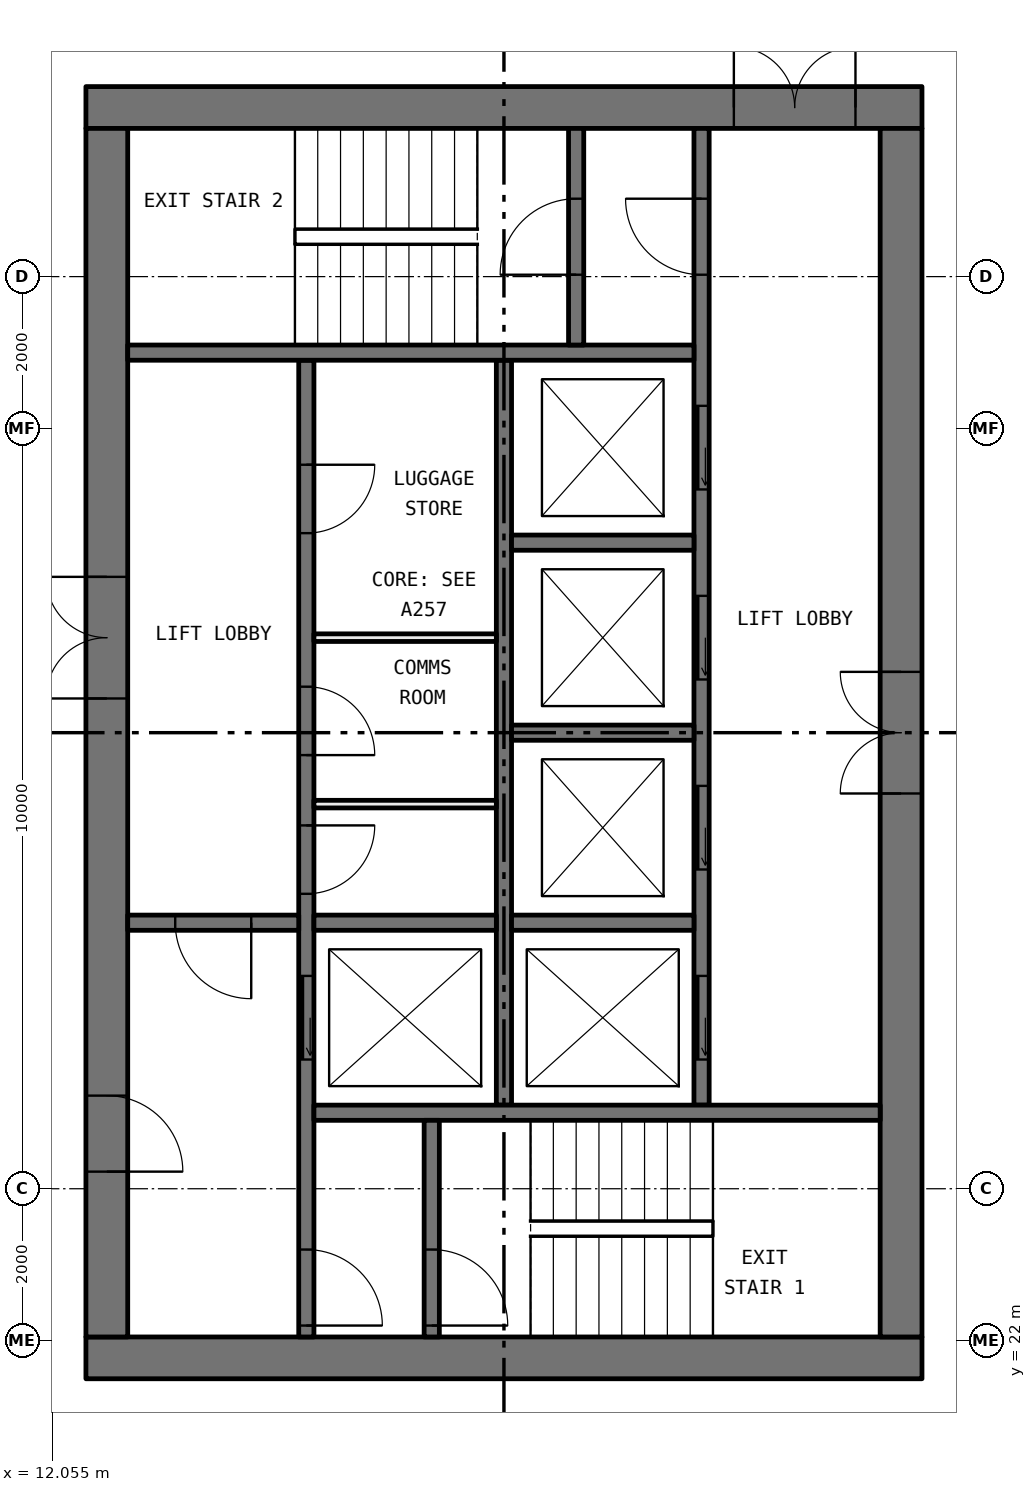
"""IFC4 building model, lengths in metres.
Left out: names, types, materials, properties, quantities, classifications, styles, units other than length and angle.
Written with IfcOpenShell. Run it as: python <this file> out.ifc"""

import sys

from ifc_helpers import new_model, si_unit, direction, frame, frame_2d, origin, place, context, subcontext, project, spatial, rectangle, extrude, element, fill, save


model = new_model("IFC4")
c1 = context("Model", 3, precision=1e-05, world=origin(), true_north=direction((0.0, 1.0)))
c2 = subcontext(c1, "Body", "Model", "MODEL_VIEW")
j1 = project(units=[si_unit("LENGTHUNIT", "METRE"), si_unit("PLANEANGLEUNIT", "RADIAN")], contexts=[c1])
p1 = place(None, origin())
s1 = spatial("IfcSite", under=j1, at=p1, CompositionType="ELEMENT")
p2 = place(p1, origin())
s2 = spatial("IfcBuilding", under=s1, at=p2, CompositionType="ELEMENT")
p3 = place(p2, frame((0.0, 0.0, 210.0)))
s3 = spatial("IfcBuildingStorey", under=s2, at=p3, CompositionType="ELEMENT", Elevation=210.0)
p4 = place(p3, frame((12.5, 21.775, 0.0), z_axis=(0.0, 0.0, 1.0), x_axis=(1.0, 0.0, 0.0)))
e1 = element("IfcWall", 1, at=p4, inside=s3, PredefinedType="SHEAR", context=c2, shape_type="SweptSolid", body=[
    extrude(rectangle(XDim=11.0, YDim=0.55, at=frame_2d((5.5, 0.0))), origin(), (0.0, 0.0, 1.0), 3.05),
])
p5 = place(p3, frame((12.5, 38.225, 0.0), z_axis=(0.0, 0.0, 1.0), x_axis=(1.0, 0.0, 0.0)))
e2 = element("IfcWall", 2, at=p5, inside=s3, PredefinedType="SHEAR", context=c2, shape_type="SweptSolid", body=[
    extrude(rectangle(XDim=11.0, YDim=0.55, at=frame_2d((5.5, 0.0))), origin(), (0.0, 0.0, 1.0), 3.05),
])
p6 = place(p5, frame((8.525, 0.0, 0.0)))
e3 = element("IfcOpeningElement", 3, at=p6, cuts=e2, PredefinedType="OPENING", context=c2, shape_type="SweptSolid", body=[
    extrude(rectangle(XDim=1.6, YDim=2.1, at=frame_2d((0.8, 1.05))), frame((0.0, 0.285, 0.0), z_axis=(0.0, -1.0, 0.0), x_axis=(1.0, 0.0, 0.0)), (0.0, 0.0, 1.0), 0.57),
])
p7 = place(p3, frame((12.775, 22.05, 0.0), z_axis=(0.0, 0.0, 1.0), x_axis=(0.0, 1.0, 0.0)))
e4 = element("IfcWall", 4, at=p7, inside=s3, PredefinedType="SHEAR", context=c2, shape_type="SweptSolid", body=[
    extrude(rectangle(XDim=15.9, YDim=0.55, at=frame_2d((7.95, 0.0))), origin(), (0.0, 0.0, 1.0), 3.05),
])
p8 = place(p7, frame((8.4, 0.0, 0.0)))
e5 = element("IfcOpeningElement", 5, at=p8, cuts=e4, PredefinedType="OPENING", context=c2, shape_type="SweptSolid", body=[
    extrude(rectangle(XDim=1.6, YDim=2.1, at=frame_2d((0.8, 1.05))), frame((0.0, 0.285, 0.0), z_axis=(0.0, -1.0, 0.0), x_axis=(1.0, 0.0, 0.0)), (0.0, 0.0, 1.0), 0.57),
])
p9 = place(p7, frame((2.175, 0.0, 0.0)))
e6 = element("IfcOpeningElement", 6, at=p9, cuts=e4, PredefinedType="OPENING", context=c2, shape_type="SweptSolid", body=[
    extrude(rectangle(XDim=1.0, YDim=2.1, at=frame_2d((0.5, 1.05))), frame((0.0, 0.285, 0.0), z_axis=(0.0, -1.0, 0.0), x_axis=(1.0, 0.0, 0.0)), (0.0, 0.0, 1.0), 0.57),
])
p10 = place(p3, frame((23.225, 22.05, 0.0), z_axis=(0.0, 0.0, 1.0), x_axis=(0.0, 1.0, 0.0)))
e7 = element("IfcWall", 7, at=p10, inside=s3, PredefinedType="SHEAR", context=c2, shape_type="SweptSolid", body=[
    extrude(rectangle(XDim=15.9, YDim=0.55, at=frame_2d((7.95, 0.0))), origin(), (0.0, 0.0, 1.0), 3.05),
])
p11 = place(p10, frame((7.15, 0.0, 0.0)))
e8 = element("IfcOpeningElement", 8, at=p11, cuts=e7, PredefinedType="OPENING", context=c2, shape_type="SweptSolid", body=[
    extrude(rectangle(XDim=1.6, YDim=2.1, at=frame_2d((0.8, 1.05))), frame((0.0, 0.285, 0.0), z_axis=(0.0, -1.0, 0.0), x_axis=(1.0, 0.0, 0.0)), (0.0, 0.0, 1.0), 0.57),
])
p12 = place(p3, frame((15.4, 22.05, 0.0), z_axis=(0.0, 0.0, 1.0), x_axis=(0.0, 1.0, 0.0)))
e9 = element("IfcWall", 9, at=p12, inside=s3, PredefinedType="SOLIDWALL", context=c2, shape_type="SweptSolid", body=[
    extrude(rectangle(XDim=12.85, YDim=0.2, at=frame_2d((6.425, 0.0))), origin(), (0.0, 0.0, 1.0), 3.05),
])
p13 = place(p12, frame((3.65, 0.0, 0.0)))
e10 = element("IfcOpeningElement", 10, at=p13, cuts=e9, PredefinedType="OPENING", context=c2, shape_type="SweptSolid", body=[
    extrude(rectangle(XDim=1.1, YDim=2.1, at=frame_2d((0.55, 1.05))), frame((0.0, 0.11, 0.0), z_axis=(0.0, -1.0, 0.0), x_axis=(1.0, 0.0, 0.0)), (0.0, 0.0, 1.0), 0.22),
])
p14 = place(p12, frame((0.15, 0.0, 0.0)))
e11 = element("IfcOpeningElement", 11, at=p14, cuts=e9, PredefinedType="OPENING", context=c2, shape_type="SweptSolid", body=[
    extrude(rectangle(XDim=1.0, YDim=2.1, at=frame_2d((0.5, 1.05))), frame((0.0, 0.11, 0.0), z_axis=(0.0, -1.0, 0.0), x_axis=(1.0, 0.0, 0.0)), (0.0, 0.0, 1.0), 0.22),
])
p15 = place(p12, frame((5.83, 0.0, 0.0)))
e12 = element("IfcOpeningElement", 12, at=p15, cuts=e9, PredefinedType="OPENING", context=c2, shape_type="SweptSolid", body=[
    extrude(rectangle(XDim=0.9, YDim=2.1, at=frame_2d((0.45, 1.05))), frame((0.0, 0.11, 0.0), z_axis=(0.0, -1.0, 0.0), x_axis=(1.0, 0.0, 0.0)), (0.0, 0.0, 1.0), 0.22),
])
p16 = place(p12, frame((7.655, 0.0, 0.0)))
e13 = element("IfcOpeningElement", 13, at=p16, cuts=e9, PredefinedType="OPENING", context=c2, shape_type="SweptSolid", body=[
    extrude(rectangle(XDim=0.9, YDim=2.1, at=frame_2d((0.45, 1.05))), frame((0.0, 0.11, 0.0), z_axis=(0.0, -1.0, 0.0), x_axis=(1.0, 0.0, 0.0)), (0.0, 0.0, 1.0), 0.22),
])
p17 = place(p12, frame((10.575, 0.0, 0.0)))
e14 = element("IfcOpeningElement", 14, at=p17, cuts=e9, PredefinedType="OPENING", context=c2, shape_type="SweptSolid", body=[
    extrude(rectangle(XDim=0.9, YDim=2.1, at=frame_2d((0.45, 1.05))), frame((0.0, 0.11, 0.0), z_axis=(0.0, -1.0, 0.0), x_axis=(1.0, 0.0, 0.0)), (0.0, 0.0, 1.0), 0.22),
])
p18 = place(p3, frame((20.6, 25.1, 0.0), z_axis=(0.0, 0.0, 1.0), x_axis=(0.0, 1.0, 0.0)))
e15 = element("IfcWall", 15, at=p18, inside=s3, PredefinedType="SOLIDWALL", context=c2, shape_type="SweptSolid", body=[
    extrude(rectangle(XDim=12.85, YDim=0.2, at=frame_2d((6.425, 0.0))), origin(), (0.0, 0.0, 1.0), 3.05),
])
p19 = place(p18, frame((0.6, 0.0, 0.0)))
e16 = element("IfcOpeningElement", 16, at=p19, cuts=e15, PredefinedType="OPENING", context=c2, shape_type="SweptSolid", body=[
    extrude(rectangle(XDim=1.1, YDim=2.1, at=frame_2d((0.55, 1.05))), frame((0.0, 0.11, 0.0), z_axis=(0.0, -1.0, 0.0), x_axis=(1.0, 0.0, 0.0)), (0.0, 0.0, 1.0), 0.22),
])
p20 = place(p18, frame((3.1, 0.0, 0.0)))
e17 = element("IfcOpeningElement", 17, at=p20, cuts=e15, PredefinedType="OPENING", context=c2, shape_type="SweptSolid", body=[
    extrude(rectangle(XDim=1.1, YDim=2.1, at=frame_2d((0.55, 1.05))), frame((0.0, 0.11, 0.0), z_axis=(0.0, -1.0, 0.0), x_axis=(1.0, 0.0, 0.0)), (0.0, 0.0, 1.0), 0.22),
])
p21 = place(p18, frame((5.6, 0.0, 0.0)))
e18 = element("IfcOpeningElement", 18, at=p21, cuts=e15, PredefinedType="OPENING", context=c2, shape_type="SweptSolid", body=[
    extrude(rectangle(XDim=1.1, YDim=2.1, at=frame_2d((0.55, 1.05))), frame((0.0, 0.11, 0.0), z_axis=(0.0, -1.0, 0.0), x_axis=(1.0, 0.0, 0.0)), (0.0, 0.0, 1.0), 0.22),
])
p22 = place(p18, frame((8.1, 0.0, 0.0)))
e19 = element("IfcOpeningElement", 19, at=p22, cuts=e15, PredefinedType="OPENING", context=c2, shape_type="SweptSolid", body=[
    extrude(rectangle(XDim=1.1, YDim=2.1, at=frame_2d((0.55, 1.05))), frame((0.0, 0.11, 0.0), z_axis=(0.0, -1.0, 0.0), x_axis=(1.0, 0.0, 0.0)), (0.0, 0.0, 1.0), 0.22),
])
p23 = place(p18, frame((10.925, 0.0, 0.0)))
e20 = element("IfcOpeningElement", 20, at=p23, cuts=e15, PredefinedType="OPENING", context=c2, shape_type="SweptSolid", body=[
    extrude(rectangle(XDim=1.0, YDim=2.1, at=frame_2d((0.5, 1.05))), frame((0.0, 0.11, 0.0), z_axis=(0.0, -1.0, 0.0), x_axis=(1.0, 0.0, 0.0)), (0.0, 0.0, 1.0), 0.22),
])
p24 = place(p3, frame((18.0, 25.1, 0.0), z_axis=(0.0, 0.0, 1.0), x_axis=(0.0, 1.0, 0.0)))
e21 = element("IfcWall", 21, at=p24, inside=s3, PredefinedType="SOLIDWALL", context=c2, shape_type="SweptSolid", body=[
    extrude(rectangle(XDim=9.8, YDim=0.2, at=frame_2d((4.9, 0.0))), origin(), (0.0, 0.0, 1.0), 3.05),
])
for number, where, z_axis, x_axis in (
    (22, (15.5, 25.0, 0.0), (0.0, 0.0, 1.0), (1.0, 0.0, 0.0)),
    (23, (13.05, 35.0, 0.0), (0.0, 0.0, 1.0), (1.0, 0.0, 0.0)),
):
    element("IfcWall", number, at=place(p3, frame(where, z_axis=z_axis, x_axis=x_axis)), inside=s3, PredefinedType="SOLIDWALL", context=c2, shape_type="SweptSolid", body=[
        extrude(rectangle(XDim=7.45, YDim=0.2, at=frame_2d((3.725, 0.0))), origin(), (0.0, 0.0, 1.0), 3.05),
    ])
p25 = place(p3, frame((13.05, 27.5, 0.0), z_axis=(0.0, 0.0, 1.0), x_axis=(1.0, 0.0, 0.0)))
e24 = element("IfcWall", 24, at=p25, inside=s3, PredefinedType="SOLIDWALL", context=c2, shape_type="SweptSolid", body=[
    extrude(rectangle(XDim=2.25, YDim=0.2, at=frame_2d((1.125, 0.0))), origin(), (0.0, 0.0, 1.0), 3.05),
])
p26 = place(p25, frame((0.625, 0.0, 0.0)))
e25 = element("IfcOpeningElement", 25, at=p26, cuts=e24, PredefinedType="OPENING", context=c2, shape_type="SweptSolid", body=[
    extrude(rectangle(XDim=1.0, YDim=2.1, at=frame_2d((0.5, 1.05))), frame((0.0, 0.11, 0.0), z_axis=(0.0, -1.0, 0.0), x_axis=(1.0, 0.0, 0.0)), (0.0, 0.0, 1.0), 0.22),
])
p27 = place(p3, frame((17.05, 22.05, 0.0), z_axis=(0.0, 0.0, 1.0), x_axis=(0.0, 1.0, 0.0)))
e26 = element("IfcWall", 26, at=p27, inside=s3, PredefinedType="SOLIDWALL", context=c2, shape_type="SweptSolid", body=[
    extrude(rectangle(XDim=2.85, YDim=0.2, at=frame_2d((1.425, 0.0))), origin(), (0.0, 0.0, 1.0), 3.05),
])
p28 = place(p27, frame((0.15, 0.0, 0.0)))
e27 = element("IfcOpeningElement", 27, at=p28, cuts=e26, PredefinedType="OPENING", context=c2, shape_type="SweptSolid", body=[
    extrude(rectangle(XDim=1.0, YDim=2.1, at=frame_2d((0.5, 1.05))), frame((0.0, 0.11, 0.0), z_axis=(0.0, -1.0, 0.0), x_axis=(1.0, 0.0, 0.0)), (0.0, 0.0, 1.0), 0.22),
])
p29 = place(p3, frame((18.95, 35.1, 0.0), z_axis=(0.0, 0.0, 1.0), x_axis=(0.0, 1.0, 0.0)))
e28 = element("IfcWall", 28, at=p29, inside=s3, PredefinedType="SOLIDWALL", context=c2, shape_type="SweptSolid", body=[
    extrude(rectangle(XDim=2.85, YDim=0.2, at=frame_2d((1.425, 0.0))), origin(), (0.0, 0.0, 1.0), 3.05),
])
p30 = place(p29, frame((0.925, 0.0, 0.0)))
e29 = element("IfcOpeningElement", 29, at=p30, cuts=e28, PredefinedType="OPENING", context=c2, shape_type="SweptSolid", body=[
    extrude(rectangle(XDim=1.0, YDim=2.1, at=frame_2d((0.5, 1.05))), frame((0.0, 0.11, 0.0), z_axis=(0.0, -1.0, 0.0), x_axis=(1.0, 0.0, 0.0)), (0.0, 0.0, 1.0), 0.22),
])
for number, where, z_axis, x_axis in (
    (30, (15.5, 27.5, 0.0), (0.0, 0.0, 1.0), (1.0, 0.0, 0.0)),
    (31, (18.1, 27.5, 0.0), (0.0, 0.0, 1.0), (1.0, 0.0, 0.0)),
    (32, (18.1, 30.0, 0.0), (0.0, 0.0, 1.0), (1.0, 0.0, 0.0)),
    (33, (18.1, 32.5, 0.0), (0.0, 0.0, 1.0), (1.0, 0.0, 0.0)),
):
    element("IfcWall", number, at=place(p3, frame(where, z_axis=z_axis, x_axis=x_axis)), inside=s3, PredefinedType="SOLIDWALL", context=c2, shape_type="SweptSolid", body=[
        extrude(rectangle(XDim=2.4, YDim=0.2, at=frame_2d((1.2, 0.0))), origin(), (0.0, 0.0, 1.0), 3.05),
    ])
for number, where, z_axis, x_axis in (
    (34, (15.5, 29.06, 0.0), (0.0, 0.0, 1.0), (1.0, 0.0, 0.0)),
    (35, (15.5, 31.25, 0.0), (0.0, 0.0, 1.0), (1.0, 0.0, 0.0)),
):
    element("IfcWall", number, at=place(p3, frame(where, z_axis=z_axis, x_axis=x_axis)), inside=s3, PredefinedType="PARTITIONING", context=c2, shape_type="SweptSolid", body=[
        extrude(rectangle(XDim=2.4, YDim=0.1, at=frame_2d((1.2, 0.0))), origin(), (0.0, 0.0, 1.0), 3.05),
    ])
p31 = place(p19, origin())
e36 = element("IfcDoor", 36, at=p31, inside=s3, OperationType="SLIDING_TO_LEFT", PredefinedType="DOOR", context=c2, shape_type="SweptSolid", body=[
    extrude(rectangle(XDim=1.1, YDim=2.1, at=frame_2d((0.55, 1.05))), frame((0.0, 0.025, 0.0), z_axis=(0.0, -1.0, 0.0), x_axis=(1.0, 0.0, 0.0)), (0.0, 0.0, 1.0), 0.05),
])
fill(e16, e36)
p32 = place(p20, origin())
e37 = element("IfcDoor", 37, at=p32, inside=s3, OperationType="SLIDING_TO_LEFT", PredefinedType="DOOR", context=c2, shape_type="SweptSolid", body=[
    extrude(rectangle(XDim=1.1, YDim=2.1, at=frame_2d((0.55, 1.05))), frame((0.0, 0.025, 0.0), z_axis=(0.0, -1.0, 0.0), x_axis=(1.0, 0.0, 0.0)), (0.0, 0.0, 1.0), 0.05),
])
fill(e17, e37)
p33 = place(p21, origin())
e38 = element("IfcDoor", 38, at=p33, inside=s3, OperationType="SLIDING_TO_LEFT", PredefinedType="DOOR", context=c2, shape_type="SweptSolid", body=[
    extrude(rectangle(XDim=1.1, YDim=2.1, at=frame_2d((0.55, 1.05))), frame((0.0, 0.025, 0.0), z_axis=(0.0, -1.0, 0.0), x_axis=(1.0, 0.0, 0.0)), (0.0, 0.0, 1.0), 0.05),
])
fill(e18, e38)
p34 = place(p22, origin())
e39 = element("IfcDoor", 39, at=p34, inside=s3, OperationType="SLIDING_TO_LEFT", PredefinedType="DOOR", context=c2, shape_type="SweptSolid", body=[
    extrude(rectangle(XDim=1.1, YDim=2.1, at=frame_2d((0.55, 1.05))), frame((0.0, 0.025, 0.0), z_axis=(0.0, -1.0, 0.0), x_axis=(1.0, 0.0, 0.0)), (0.0, 0.0, 1.0), 0.05),
])
fill(e19, e39)
p35 = place(p13, origin())
e40 = element("IfcDoor", 40, at=p35, inside=s3, OperationType="SLIDING_TO_LEFT", PredefinedType="DOOR", context=c2, shape_type="SweptSolid", body=[
    extrude(rectangle(XDim=1.1, YDim=2.1, at=frame_2d((0.55, 1.05))), frame((0.0, 0.025, 0.0), z_axis=(0.0, -1.0, 0.0), x_axis=(1.0, 0.0, 0.0)), (0.0, 0.0, 1.0), 0.05),
])
fill(e10, e40)
p36 = place(p28, frame((1.0, 0.0, 0.0), x_axis=(-1.0, 0.0, 0.0)))
e41 = element("IfcDoor", 41, at=p36, inside=s3, OperationType="SINGLE_SWING_LEFT", PredefinedType="DOOR", context=c2, shape_type="SweptSolid", body=[
    extrude(rectangle(XDim=1.0, YDim=2.1, at=frame_2d((0.5, 1.05))), frame((0.0, 0.025, 0.0), z_axis=(0.0, -1.0, 0.0), x_axis=(1.0, 0.0, 0.0)), (0.0, 0.0, 1.0), 0.05),
])
fill(e27, e41)
p37 = place(p14, frame((1.0, 0.0, 0.0), x_axis=(-1.0, 0.0, 0.0)))
e42 = element("IfcDoor", 42, at=p37, inside=s3, OperationType="SINGLE_SWING_LEFT", PredefinedType="DOOR", context=c2, shape_type="SweptSolid", body=[
    extrude(rectangle(XDim=1.0, YDim=2.1, at=frame_2d((0.5, 1.05))), frame((0.0, 0.025, 0.0), z_axis=(0.0, -1.0, 0.0), x_axis=(1.0, 0.0, 0.0)), (0.0, 0.0, 1.0), 0.05),
])
fill(e11, e42)
p38 = place(p23, origin())
e43 = element("IfcDoor", 43, at=p38, inside=s3, OperationType="SINGLE_SWING_LEFT", PredefinedType="DOOR", context=c2, shape_type="SweptSolid", body=[
    extrude(rectangle(XDim=1.0, YDim=2.1, at=frame_2d((0.5, 1.05))), frame((0.0, 0.025, 0.0), z_axis=(0.0, -1.0, 0.0), x_axis=(1.0, 0.0, 0.0)), (0.0, 0.0, 1.0), 0.05),
])
fill(e20, e43)
p39 = place(p30, origin())
e44 = element("IfcDoor", 44, at=p39, inside=s3, OperationType="SINGLE_SWING_RIGHT", PredefinedType="DOOR", context=c2, shape_type="SweptSolid", body=[
    extrude(rectangle(XDim=1.0, YDim=2.1, at=frame_2d((0.5, 1.05))), frame((0.0, 0.025, 0.0), z_axis=(0.0, -1.0, 0.0), x_axis=(1.0, 0.0, 0.0)), (0.0, 0.0, 1.0), 0.05),
])
fill(e29, e44)
p40 = place(p26, frame((1.0, 0.0, 0.0), x_axis=(-1.0, 0.0, 0.0)))
e45 = element("IfcDoor", 45, at=p40, inside=s3, OperationType="SINGLE_SWING_RIGHT", PredefinedType="DOOR", context=c2, shape_type="SweptSolid", body=[
    extrude(rectangle(XDim=1.0, YDim=2.1, at=frame_2d((0.5, 1.05))), frame((0.0, 0.025, 0.0), z_axis=(0.0, -1.0, 0.0), x_axis=(1.0, 0.0, 0.0)), (0.0, 0.0, 1.0), 0.05),
])
fill(e25, e45)
p41 = place(p8, origin())
e46 = element("IfcDoor", 46, at=p41, inside=s3, OperationType="DOUBLE_DOOR_SINGLE_SWING", PredefinedType="DOOR", context=c2, shape_type="SweptSolid", body=[
    extrude(rectangle(XDim=1.6, YDim=2.1, at=frame_2d((0.8, 1.05))), frame((0.0, 0.025, 0.0), z_axis=(0.0, -1.0, 0.0), x_axis=(1.0, 0.0, 0.0)), (0.0, 0.0, 1.0), 0.05),
])
fill(e5, e46)
p42 = place(p9, frame((1.0, 0.0, 0.0), x_axis=(-1.0, 0.0, 0.0)))
e47 = element("IfcDoor", 47, at=p42, inside=s3, OperationType="SINGLE_SWING_LEFT", PredefinedType="DOOR", context=c2, shape_type="SweptSolid", body=[
    extrude(rectangle(XDim=1.0, YDim=2.1, at=frame_2d((0.5, 1.05))), frame((0.0, 0.025, 0.0), z_axis=(0.0, -1.0, 0.0), x_axis=(1.0, 0.0, 0.0)), (0.0, 0.0, 1.0), 0.05),
])
fill(e6, e47)
p43 = place(p6, origin())
e48 = element("IfcDoor", 48, at=p43, inside=s3, OperationType="DOUBLE_DOOR_SINGLE_SWING", PredefinedType="DOOR", context=c2, shape_type="SweptSolid", body=[
    extrude(rectangle(XDim=1.6, YDim=2.1, at=frame_2d((0.8, 1.05))), frame((0.0, 0.025, 0.0), z_axis=(0.0, -1.0, 0.0), x_axis=(1.0, 0.0, 0.0)), (0.0, 0.0, 1.0), 0.05),
])
fill(e3, e48)
p44 = place(p11, origin())
e49 = element("IfcDoor", 49, at=p44, inside=s3, OperationType="DOUBLE_DOOR_SINGLE_SWING", PredefinedType="DOOR", context=c2, shape_type="SweptSolid", body=[
    extrude(rectangle(XDim=1.6, YDim=2.1, at=frame_2d((0.8, 1.05))), frame((0.0, 0.025, 0.0), z_axis=(0.0, -1.0, 0.0), x_axis=(1.0, 0.0, 0.0)), (0.0, 0.0, 1.0), 0.05),
])
fill(e8, e49)
p45 = place(p15, frame((0.9, 0.0, 0.0), x_axis=(-1.0, 0.0, 0.0)))
e50 = element("IfcDoor", 50, at=p45, inside=s3, OperationType="SINGLE_SWING_RIGHT", PredefinedType="DOOR", context=c2, shape_type="SweptSolid", body=[
    extrude(rectangle(XDim=0.9, YDim=2.1, at=frame_2d((0.45, 1.05))), frame((0.0, 0.025, 0.0), z_axis=(0.0, -1.0, 0.0), x_axis=(1.0, 0.0, 0.0)), (0.0, 0.0, 1.0), 0.05),
])
fill(e12, e50)
p46 = place(p16, frame((0.9, 0.0, 0.0), x_axis=(-1.0, 0.0, 0.0)))
e51 = element("IfcDoor", 51, at=p46, inside=s3, OperationType="SINGLE_SWING_LEFT", PredefinedType="DOOR", context=c2, shape_type="SweptSolid", body=[
    extrude(rectangle(XDim=0.9, YDim=2.1, at=frame_2d((0.45, 1.05))), frame((0.0, 0.025, 0.0), z_axis=(0.0, -1.0, 0.0), x_axis=(1.0, 0.0, 0.0)), (0.0, 0.0, 1.0), 0.05),
])
fill(e13, e51)
p47 = place(p17, frame((0.9, 0.0, 0.0), x_axis=(-1.0, 0.0, 0.0)))
e52 = element("IfcDoor", 52, at=p47, inside=s3, OperationType="SINGLE_SWING_RIGHT", PredefinedType="DOOR", context=c2, shape_type="SweptSolid", body=[
    extrude(rectangle(XDim=0.9, YDim=2.1, at=frame_2d((0.45, 1.05))), frame((0.0, 0.025, 0.0), z_axis=(0.0, -1.0, 0.0), x_axis=(1.0, 0.0, 0.0)), (0.0, 0.0, 1.0), 0.05),
])
fill(e14, e52)
save(model, sys.argv[1])
